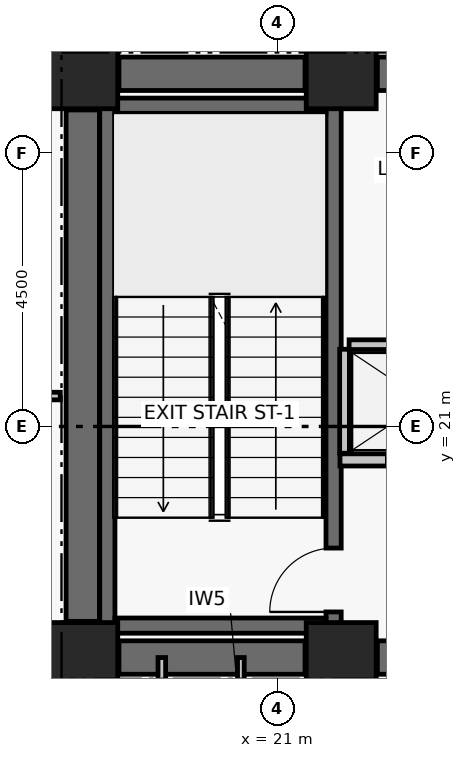
"""IFC4 building model, lengths in metres.
Left out: names, types, materials, properties, quantities, classifications, styles, units other than length and angle.
Written with IfcOpenShell. Run it as: python <this file> out.ifc"""

import sys

from ifc_helpers import new_model, si_unit, direction, frame, frame_2d, origin, origin_2d, place, context, subcontext, project, spatial, rectangle, extrude, element, fill, save


model = new_model("IFC4")
c1 = context("Model", 3, precision=1e-05, world=origin(), true_north=direction((0.0, 1.0)))
c2 = subcontext(c1, "Body", "Model", "MODEL_VIEW")
j1 = project(units=[si_unit("LENGTHUNIT", "METRE"), si_unit("PLANEANGLEUNIT", "RADIAN")], contexts=[c1])
p1 = place(None, origin())
s1 = spatial("IfcSite", under=j1, at=p1, CompositionType="ELEMENT")
p2 = place(p1, origin())
s2 = spatial("IfcBuilding", under=s1, at=p2, CompositionType="ELEMENT")
p3 = place(p2, frame((0.0, 0.0, 107.7)))
s3 = spatial("IfcBuildingStorey", under=s2, at=p3, CompositionType="ELEMENT", Elevation=107.7)
for number, where, z_axis, x_axis in (
    (1, (17.8, 17.2, 0.0), (0.0, 0.0, 1.0), (1.0, 0.0, 0.0)),
    (2, (22.05, 17.2, 0.0), (0.0, 0.0, 1.0), (1.0, 0.0, 0.0)),
    (3, (17.8, 26.8, 0.0), (0.0, 0.0, 1.0), (1.0, 0.0, 0.0)),
    (4, (22.05, 26.8, 0.0), (0.0, 0.0, 1.0), (1.0, 0.0, 0.0)),
):
    element("IfcColumn", number, at=place(p3, frame(where, z_axis=z_axis, x_axis=x_axis)), inside=s3, PredefinedType="COLUMN", context=c2, shape_type="SweptSolid", body=[
        extrude(rectangle(XDim=1.15, YDim=1.15, at=origin_2d()), origin(), (0.0, 0.0, 1.0), 3.72),
    ])
p4 = place(p3, frame((18.395, 17.2, 0.0), z_axis=(0.0, 0.0, 1.0), x_axis=(1.0, 0.0, 0.0)))
e5 = element("IfcWall", 5, at=p4, inside=s3, PredefinedType="SHEAR", context=c2, shape_type="SweptSolid", body=[
    extrude(rectangle(XDim=3.06, YDim=0.55, at=frame_2d((1.53, 0.0))), origin(), (0.0, 0.0, 1.0), 3.47),
])
p5 = place(p3, frame((22.645, 17.2, 0.0), z_axis=(0.0, 0.0, 1.0), x_axis=(1.0, 0.0, 0.0)))
e6 = element("IfcWall", 6, at=p5, inside=s3, PredefinedType="SHEAR", context=c2, shape_type="SweptSolid", body=[
    extrude(rectangle(XDim=1.705, YDim=0.55, at=frame_2d((0.853, 0.0))), origin(), (0.0, 0.0, 1.0), 3.47),
])
p6 = place(p3, frame((18.395, 26.8, 0.0), z_axis=(0.0, 0.0, 1.0), x_axis=(1.0, 0.0, 0.0)))
e7 = element("IfcWall", 7, at=p6, inside=s3, PredefinedType="SHEAR", context=c2, shape_type="SweptSolid", body=[
    extrude(rectangle(XDim=3.06, YDim=0.55, at=frame_2d((1.53, 0.0))), origin(), (0.0, 0.0, 1.0), 3.47),
])
p7 = place(p3, frame((22.645, 26.8, 0.0), z_axis=(0.0, 0.0, 1.0), x_axis=(1.0, 0.0, 0.0)))
e8 = element("IfcWall", 8, at=p7, inside=s3, PredefinedType="SHEAR", context=c2, shape_type="SweptSolid", body=[
    extrude(rectangle(XDim=1.705, YDim=0.55, at=frame_2d((0.853, 0.0))), origin(), (0.0, 0.0, 1.0), 3.47),
])
p8 = place(p3, frame((17.8, 17.795, 0.0), z_axis=(0.0, 0.0, 1.0), x_axis=(0.0, 1.0, 0.0)))
e9 = element("IfcWall", 9, at=p8, inside=s3, PredefinedType="SHEAR", context=c2, shape_type="SweptSolid", body=[
    extrude(rectangle(XDim=8.41, YDim=0.55, at=frame_2d((4.205, 0.0))), origin(), (0.0, 0.0, 1.0), 3.47),
])
p9 = place(p3, frame((18.204, 17.6, 0.0), z_axis=(0.0, 0.0, 1.0), x_axis=(0.0, 1.0, 0.0)))
e10 = element("IfcWall", 10, at=p9, inside=s3, PredefinedType="SHEAR", context=c2, shape_type="SweptSolid", body=[
    extrude(rectangle(XDim=8.8, YDim=0.25, at=frame_2d((4.4, 0.0))), origin(), (0.0, 0.0, 1.0), 3.47),
])
p10 = place(p3, frame((21.925, 17.6, 0.0), z_axis=(0.0, 0.0, 1.0), x_axis=(0.0, 1.0, 0.0)))
e11 = element("IfcWall", 11, at=p10, inside=s3, PredefinedType="SHEAR", context=c2, shape_type="SweptSolid", body=[
    extrude(rectangle(XDim=8.8, YDim=0.25, at=frame_2d((4.4, 0.0))), origin(), (0.0, 0.0, 1.0), 3.47),
])
p11 = place(p10, frame((0.35, 0.0, 0.0)))
e12 = element("IfcOpeningElement", 12, at=p11, cuts=e11, PredefinedType="OPENING", context=c2, shape_type="SweptSolid", body=[
    extrude(rectangle(XDim=1.05, YDim=2.08, at=frame_2d((0.525, 1.04))), frame((0.0, 0.135, 0.0), z_axis=(0.0, -1.0, 0.0), x_axis=(1.0, 0.0, 0.0)), (0.0, 0.0, 1.0), 0.27),
])
for number, where, z_axis, x_axis in (
    (13, (18.329, 17.725, 0.0), (0.0, 0.0, 1.0), (1.0, 0.0, 0.0)),
    (14, (18.329, 26.275, 0.0), (0.0, 0.0, 1.0), (1.0, 0.0, 0.0)),
):
    element("IfcWall", number, at=place(p3, frame(where, z_axis=z_axis, x_axis=x_axis)), inside=s3, PredefinedType="SHEAR", context=c2, shape_type="SweptSolid", body=[
        extrude(rectangle(XDim=3.471, YDim=0.25, at=frame_2d((1.735, 0.0))), origin(), (0.0, 0.0, 1.0), 3.47),
    ])
p12 = place(p3, frame((22.03, 20.45, 0.0), z_axis=(0.0, 0.0, 1.0), x_axis=(1.0, 0.0, 0.0)))
e15 = element("IfcWall", 15, at=p12, inside=s3, PredefinedType="PARTITIONING", context=c2, shape_type="SweptSolid", body=[
    extrude(rectangle(XDim=2.8, YDim=0.2, at=frame_2d((1.4, 0.0))), origin(), (0.0, 0.0, 1.0), 3.47),
])
p13 = place(p12, frame((0.78, 0.0, 0.0)))
e16 = element("IfcOpeningElement", 16, at=p13, cuts=e15, PredefinedType="OPENING", context=c2, shape_type="SweptSolid", body=[
    extrude(rectangle(XDim=1.1, YDim=2.08, at=frame_2d((0.55, 1.04))), frame((0.0, 0.11, 0.0), z_axis=(0.0, -1.0, 0.0), x_axis=(1.0, 0.0, 0.0)), (0.0, 0.0, 1.0), 0.22),
])
p14 = place(p3, frame((22.105, 20.56, 0.0), z_axis=(0.0, 0.0, 1.0), x_axis=(0.0, 1.0, 0.0)))
e17 = element("IfcWall", 17, at=p14, inside=s3, PredefinedType="PARTITIONING", context=c2, shape_type="SweptSolid", body=[
    extrude(rectangle(XDim=1.71, YDim=0.16, at=frame_2d((0.855, 0.0))), origin(), (0.0, 0.0, 1.0), 3.47),
])
p15 = place(p3, frame((22.18, 22.345, 0.0), z_axis=(0.0, 0.0, 1.0), x_axis=(1.0, 0.0, 0.0)))
e18 = element("IfcWall", 18, at=p15, inside=s3, PredefinedType="PARTITIONING", context=c2, shape_type="SweptSolid", body=[
    extrude(rectangle(XDim=2.65, YDim=0.16, at=frame_2d((1.325, 0.0))), origin(), (0.0, 0.0, 1.0), 3.47),
])
p16 = place(p3, frame((19.1, 14.95, 0.0), z_axis=(0.0, 0.0, 1.0), x_axis=(0.0, 1.0, 0.0)))
e19 = element("IfcWall", 19, at=p16, inside=s3, PredefinedType="PARTITIONING", context=c2, shape_type="SweptSolid", body=[
    extrude(rectangle(XDim=2.25, YDim=0.125, at=frame_2d((1.125, 0.0))), origin(), (0.0, 0.0, 1.0), 2.6),
])
p17 = place(p3, frame((20.4, 14.95, 0.0), z_axis=(0.0, 0.0, 1.0), x_axis=(0.0, 1.0, 0.0)))
e20 = element("IfcWall", 20, at=p17, inside=s3, PredefinedType="PARTITIONING", context=c2, shape_type="SweptSolid", body=[
    extrude(rectangle(XDim=2.25, YDim=0.11, at=frame_2d((1.125, 0.0))), origin(), (0.0, 0.0, 1.0), 2.6),
])
p18 = place(p3, frame((22.36, 14.95, 0.0), z_axis=(0.0, 0.0, 1.0), x_axis=(0.0, 1.0, 0.0)))
e21 = element("IfcWall", 21, at=p18, inside=s3, PredefinedType="PARTITIONING", context=c2, shape_type="SweptSolid", body=[
    extrude(rectangle(XDim=2.25, YDim=0.125, at=frame_2d((1.125, 0.0))), origin(), (0.0, 0.0, 1.0), 2.6),
])
p19 = place(p3, frame((15.2, 27.06, 0.0), z_axis=(0.0, 0.0, 1.0), x_axis=(1.0, 0.0, 0.0)))
e22 = element("IfcWall", 22, at=p19, inside=s3, PredefinedType="PARTITIONING", context=c2, shape_type="SweptSolid", body=[
    extrude(rectangle(XDim=2.18, YDim=0.145, at=frame_2d((1.09, 0.0))), origin(), (0.0, 0.0, 1.0), 2.65),
])
p20 = place(p3, frame((3.128, 21.5, 0.0), z_axis=(0.0, 0.0, 1.0), x_axis=(1.0, 0.0, 0.0)))
e23 = element("IfcWall", 23, at=p20, inside=s3, PredefinedType="PARTITIONING", context=c2, shape_type="SweptSolid", body=[
    extrude(rectangle(XDim=14.302, YDim=0.125, at=frame_2d((7.151, 0.0))), origin(), (0.0, 0.0, 1.0), 2.6),
])
p21 = place(p20, frame((0.28, 0.0, 0.0)))
e24 = element("IfcOpeningElement", 24, at=p21, cuts=e23, PredefinedType="OPENING", context=c2, shape_type="SweptSolid", body=[
    extrude(rectangle(XDim=0.92, YDim=2.05, at=frame_2d((0.46, 1.025))), frame((0.0, 0.073, 0.0), z_axis=(0.0, -1.0, 0.0), x_axis=(1.0, 0.0, 0.0)), (0.0, 0.0, 1.0), 0.145),
])
p22 = place(p11, origin())
e25 = element("IfcDoor", 25, at=p22, inside=s3, OperationType="SINGLE_SWING_LEFT", PredefinedType="DOOR", context=c2, shape_type="SweptSolid", body=[
    extrude(rectangle(XDim=1.05, YDim=2.08, at=frame_2d((0.525, 1.04))), frame((0.0, 0.025, 0.0), z_axis=(0.0, -1.0, 0.0), x_axis=(1.0, 0.0, 0.0)), (0.0, 0.0, 1.0), 0.05),
])
fill(e12, e25)
save(model, sys.argv[1])
